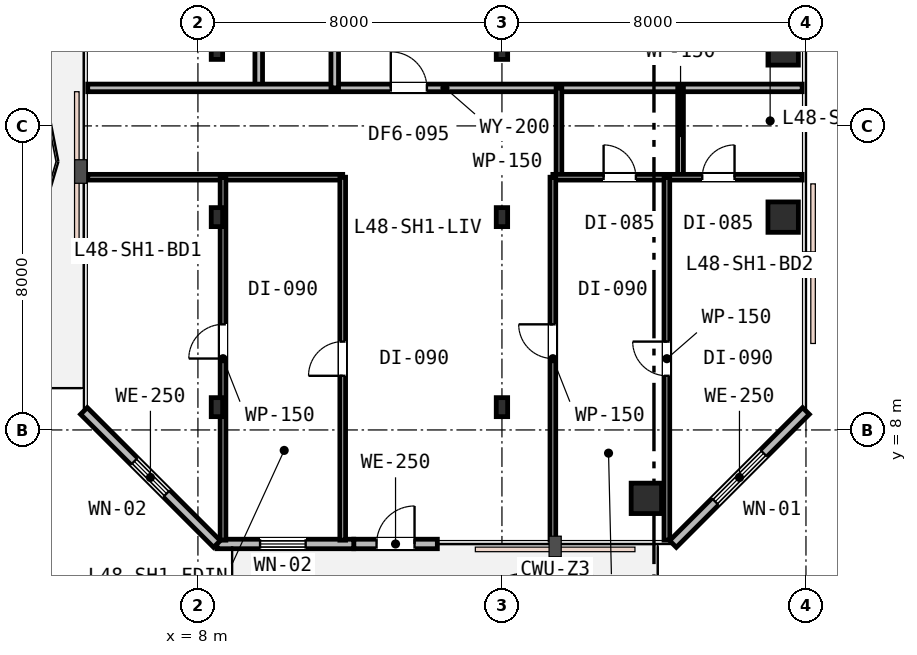
"""IFC4 building model, lengths in metres.
Left out: names, types, materials, properties, quantities, classifications, styles, units other than length and angle.
Written with IfcOpenShell. Run it as: python <this file> out.ifc"""

import sys

from ifc_helpers import new_model, si_unit, direction, frame, frame_2d, origin, origin_2d, place, context, subcontext, project, spatial, rectangle, i_section, extrude, element, fill, save


model = new_model("IFC4")
c1 = context("Model", 3, precision=1e-05, world=origin(), true_north=direction((0.0, 1.0)))
c2 = subcontext(c1, "Body", "Model", "MODEL_VIEW")
j1 = project(units=[si_unit("LENGTHUNIT", "METRE"), si_unit("PLANEANGLEUNIT", "RADIAN")], contexts=[c1])
p1 = place(None, origin())
s1 = spatial("IfcSite", under=j1, at=p1, CompositionType="ELEMENT")
p2 = place(p1, origin())
s2 = spatial("IfcBuilding", under=s1, at=p2, CompositionType="ELEMENT")
p3 = place(p2, frame((0.0, 0.0, 186.6)))
s3 = spatial("IfcBuildingStorey", under=s2, at=p3, CompositionType="ELEMENT", Elevation=186.6)
for number, where, z_axis, x_axis in (
    (1, (19.8, 6.2, 0.0), (0.0, 0.0, 1.0), (1.0, 0.0, 0.0)),
    (2, (23.4, 13.6, 0.0), (0.0, 0.0, 1.0), (1.0, 0.0, 0.0)),
    (3, (23.4, 18.0, 0.0), (0.0, 0.0, 1.0), (1.0, 0.0, 0.0)),
):
    element("IfcColumn", number, at=place(p3, frame(where, z_axis=z_axis, x_axis=x_axis)), inside=s3, PredefinedType="COLUMN", context=c2, shape_type="SweptSolid", body=[
        extrude(rectangle(XDim=0.8, YDim=0.8, at=origin_2d()), origin(), (0.0, 0.0, 1.0), 3.6),
    ])
for number, where, z_axis, x_axis in (
    (4, (8.5, 8.6, 0.0), (0.0, 0.0, 1.0), (1.0, 0.0, 0.0)),
    (5, (16.0, 8.6, 0.0), (0.0, 0.0, 1.0), (1.0, 0.0, 0.0)),
    (6, (8.5, 13.6, 0.0), (0.0, 0.0, 1.0), (1.0, 0.0, 0.0)),
    (7, (16.0, 13.6, 0.0), (0.0, 0.0, 1.0), (1.0, 0.0, 0.0)),
    (8, (8.5, 18.0, 0.0), (0.0, 0.0, 1.0), (1.0, 0.0, 0.0)),
    (9, (16.0, 18.0, 0.0), (0.0, 0.0, 1.0), (1.0, 0.0, 0.0)),
):
    element("IfcColumn", number, at=place(p3, frame(where, z_axis=z_axis, x_axis=x_axis)), inside=s3, PredefinedType="COLUMN", context=c2, shape_type="SweptSolid", body=[
        extrude(i_section(OverallWidth=0.3, OverallDepth=0.5, WebThickness=0.015, FlangeThickness=0.028, FilletRadius=0.027, at=origin_2d()), origin(), (0.0, 0.0, 1.0), 3.6),
    ])
p4 = place(p3, frame((12.1, 5.0, 0.0), z_axis=(0.0, 0.0, 1.0), x_axis=(1.0, 0.0, 0.0)))
e10 = element("IfcWall", 10, at=p4, inside=s3, PredefinedType="STANDARD", context=c2, shape_type="SweptSolid", body=[
    extrude(rectangle(XDim=2.2, YDim=0.25, at=frame_2d((1.1, 0.0))), origin(), (0.0, 0.0, 1.0), 3.33),
])
p5 = place(p4, frame((0.6, 0.0, 0.0)))
e11 = element("IfcOpeningElement", 11, at=p5, cuts=e10, PredefinedType="OPENING", context=c2, shape_type="SweptSolid", body=[
    extrude(rectangle(XDim=1.0, YDim=2.15, at=frame_2d((0.5, 1.075))), frame((0.0, 0.135, 0.0), z_axis=(0.0, -1.0, 0.0), x_axis=(1.0, 0.0, 0.0)), (0.0, 0.0, 1.0), 0.27),
])
p6 = place(p3, frame((8.5, 5.0, 0.0), z_axis=(0.0, 0.0, 1.0), x_axis=(1.0, 0.0, 0.0)))
e12 = element("IfcWall", 12, at=p6, inside=s3, PredefinedType="STANDARD", context=c2, shape_type="SweptSolid", body=[
    extrude(rectangle(XDim=3.6, YDim=0.25, at=frame_2d((1.8, 0.0))), origin(), (0.0, 0.0, 1.0), 3.33),
])
p7 = place(p6, frame((1.135, 0.0, 0.85)))
e13 = element("IfcOpeningElement", 13, at=p7, cuts=e12, PredefinedType="OPENING", context=c2, shape_type="SweptSolid", body=[
    extrude(rectangle(XDim=1.2, YDim=1.6, at=frame_2d((0.6, 0.8))), frame((0.0, 0.135, 0.0), z_axis=(0.0, -1.0, 0.0), x_axis=(1.0, 0.0, 0.0)), (0.0, 0.0, 1.0), 0.27),
])
p8 = place(p3, frame((20.5, 5.0, 0.0), z_axis=(0.0, 0.0, 1.0), x_axis=(0.707106781187, 0.707106781187, 0.0)))
e14 = element("IfcWall", 14, at=p8, inside=s3, PredefinedType="STANDARD", context=c2, shape_type="SweptSolid", body=[
    extrude(rectangle(XDim=4.95, YDim=0.25, at=frame_2d((2.475, 0.0))), origin(), (0.0, 0.0, 1.0), 3.33),
])
p9 = place(p8, frame((1.575, 0.0, 0.75)))
e15 = element("IfcOpeningElement", 15, at=p9, cuts=e14, PredefinedType="OPENING", context=c2, shape_type="SweptSolid", body=[
    extrude(rectangle(XDim=1.8, YDim=1.85, at=frame_2d((0.9, 0.925))), frame((0.0, 0.135, 0.0), z_axis=(0.0, -1.0, 0.0), x_axis=(1.0, 0.0, 0.0)), (0.0, 0.0, 1.0), 0.27),
])
p10 = place(p3, frame((5.0, 8.5, 0.0), z_axis=(0.0, 0.0, 1.0), x_axis=(0.707106781187, -0.707106781187, 0.0)))
e16 = element("IfcWall", 16, at=p10, inside=s3, PredefinedType="STANDARD", context=c2, shape_type="SweptSolid", body=[
    extrude(rectangle(XDim=4.95, YDim=0.25, at=frame_2d((2.475, 0.0))), origin(), (0.0, 0.0, 1.0), 3.33),
])
p11 = place(p10, frame((1.875, 0.0, 0.85)))
e17 = element("IfcOpeningElement", 17, at=p11, cuts=e16, PredefinedType="OPENING", context=c2, shape_type="SweptSolid", body=[
    extrude(rectangle(XDim=1.2, YDim=1.6, at=frame_2d((0.6, 0.8))), frame((0.0, 0.135, 0.0), z_axis=(0.0, -1.0, 0.0), x_axis=(1.0, 0.0, 0.0)), (0.0, 0.0, 1.0), 0.27),
])
p12 = place(p3, frame((9.6, 17.0, 0.0), z_axis=(0.0, 0.0, 1.0), x_axis=(0.0, 1.0, 0.0)))
e18 = element("IfcWall", 18, at=p12, inside=s3, PredefinedType="PARTITIONING", context=c2, shape_type="SweptSolid", body=[
    extrude(rectangle(XDim=25.9, YDim=0.2, at=frame_2d((12.95, 0.0))), origin(), (0.0, 0.0, 1.0), 2.92),
])
p13 = place(p12, frame((12.045, 0.0, 0.0)))
e19 = element("IfcOpeningElement", 19, at=p13, cuts=e18, PredefinedType="OPENING", context=c2, shape_type="SweptSolid", body=[
    extrude(rectangle(XDim=0.95, YDim=2.15, at=frame_2d((0.475, 1.075))), frame((0.0, 0.11, 0.0), z_axis=(0.0, -1.0, 0.0), x_axis=(1.0, 0.0, 0.0)), (0.0, 0.0, 1.0), 0.22),
])
p14 = place(p12, frame((3.125, 0.0, 0.0)))
e20 = element("IfcOpeningElement", 20, at=p14, cuts=e18, PredefinedType="OPENING", context=c2, shape_type="SweptSolid", body=[
    extrude(rectangle(XDim=0.95, YDim=2.15, at=frame_2d((0.475, 1.075))), frame((0.0, 0.11, 0.0), z_axis=(0.0, -1.0, 0.0), x_axis=(1.0, 0.0, 0.0)), (0.0, 0.0, 1.0), 0.22),
])
p15 = place(p3, frame((5.1, 17.0, 0.0), z_axis=(0.0, 0.0, 1.0), x_axis=(1.0, 0.0, 0.0)))
e21 = element("IfcWall", 21, at=p15, inside=s3, PredefinedType="PARTITIONING", context=c2, shape_type="SweptSolid", body=[
    extrude(rectangle(XDim=18.8, YDim=0.2, at=frame_2d((9.4, 0.0))), origin(), (0.0, 0.0, 1.0), 2.92),
])
p16 = place(p15, frame((7.975, 0.0, 0.0)))
e22 = element("IfcOpeningElement", 22, at=p16, cuts=e21, PredefinedType="OPENING", context=c2, shape_type="SweptSolid", body=[
    extrude(rectangle(XDim=0.95, YDim=2.15, at=frame_2d((0.475, 1.075))), frame((0.0, 0.11, 0.0), z_axis=(0.0, -1.0, 0.0), x_axis=(1.0, 0.0, 0.0)), (0.0, 0.0, 1.0), 0.22),
])
p17 = place(p3, frame((11.6, 17.0, 0.0), z_axis=(0.0, 0.0, 1.0), x_axis=(0.0, 1.0, 0.0)))
e23 = element("IfcWall", 23, at=p17, inside=s3, PredefinedType="PARTITIONING", context=c2, shape_type="SweptSolid", body=[
    extrude(rectangle(XDim=11.6, YDim=0.2, at=frame_2d((5.8, 0.0))), origin(), (0.0, 0.0, 1.0), 2.92),
])
p18 = place(p17, frame((8.225, 0.0, 0.0)))
e24 = element("IfcOpeningElement", 24, at=p18, cuts=e23, PredefinedType="OPENING", context=c2, shape_type="SweptSolid", body=[
    extrude(rectangle(XDim=0.95, YDim=2.15, at=frame_2d((0.475, 1.075))), frame((0.0, 0.11, 0.0), z_axis=(0.0, -1.0, 0.0), x_axis=(1.0, 0.0, 0.0)), (0.0, 0.0, 1.0), 0.22),
])
p19 = place(p17, frame((2.425, 0.0, 0.0)))
e25 = element("IfcOpeningElement", 25, at=p19, cuts=e23, PredefinedType="OPENING", context=c2, shape_type="SweptSolid", body=[
    extrude(rectangle(XDim=0.95, YDim=2.15, at=frame_2d((0.475, 1.075))), frame((0.0, 0.11, 0.0), z_axis=(0.0, -1.0, 0.0), x_axis=(1.0, 0.0, 0.0)), (0.0, 0.0, 1.0), 0.22),
])
p20 = place(p3, frame((17.5, 14.65, 0.0), z_axis=(0.0, 0.0, 1.0), x_axis=(0.0, 1.0, 0.0)))
e26 = element("IfcWall", 26, at=p20, inside=s3, PredefinedType="PARTITIONING", context=c2, shape_type="SweptSolid", body=[
    extrude(rectangle(XDim=2.35, YDim=0.15, at=frame_2d((1.175, 0.0))), origin(), (0.0, 0.0, 1.0), 3.33),
])
p21 = place(p3, frame((20.7, 14.65, 0.0), z_axis=(0.0, 0.0, 1.0), x_axis=(0.0, 1.0, 0.0)))
e27 = element("IfcWall", 27, at=p21, inside=s3, PredefinedType="PARTITIONING", context=c2, shape_type="SweptSolid", body=[
    extrude(rectangle(XDim=2.35, YDim=0.15, at=frame_2d((1.175, 0.0))), origin(), (0.0, 0.0, 1.0), 3.07),
])
p22 = place(p3, frame((17.34, 14.65, 0.0), z_axis=(0.0, 0.0, 1.0), x_axis=(1.0, 0.0, 0.0)))
e28 = element("IfcWall", 28, at=p22, inside=s3, PredefinedType="PARTITIONING", context=c2, shape_type="SweptSolid", body=[
    extrude(rectangle(XDim=6.56, YDim=0.15, at=frame_2d((3.28, 0.0))), origin(), (0.0, 0.0, 1.0), 3.02),
])
p23 = place(p22, frame((1.335, 0.0, 0.0)))
e29 = element("IfcOpeningElement", 29, at=p23, cuts=e28, PredefinedType="OPENING", context=c2, shape_type="SweptSolid", body=[
    extrude(rectangle(XDim=0.85, YDim=2.15, at=frame_2d((0.425, 1.075))), frame((0.0, 0.085, 0.0), z_axis=(0.0, -1.0, 0.0), x_axis=(1.0, 0.0, 0.0)), (0.0, 0.0, 1.0), 0.17),
])
p24 = place(p22, frame((3.93, 0.0, 0.0)))
e30 = element("IfcOpeningElement", 30, at=p24, cuts=e28, PredefinedType="OPENING", context=c2, shape_type="SweptSolid", body=[
    extrude(rectangle(XDim=0.85, YDim=2.15, at=frame_2d((0.425, 1.075))), frame((0.0, 0.085, 0.0), z_axis=(0.0, -1.0, 0.0), x_axis=(1.0, 0.0, 0.0)), (0.0, 0.0, 1.0), 0.17),
])
p25 = place(p3, frame((5.1, 14.65, 0.0), z_axis=(0.0, 0.0, 1.0), x_axis=(1.0, 0.0, 0.0)))
e31 = element("IfcWall", 31, at=p25, inside=s3, PredefinedType="PARTITIONING", context=c2, shape_type="SweptSolid", body=[
    extrude(rectangle(XDim=6.71, YDim=0.15, at=frame_2d((3.355, 0.0))), origin(), (0.0, 0.0, 1.0), 2.92),
])
p26 = place(p3, frame((8.66, 5.1, 0.0), z_axis=(0.0, 0.0, 1.0), x_axis=(0.0, 1.0, 0.0)))
e32 = element("IfcWall", 32, at=p26, inside=s3, PredefinedType="PARTITIONING", context=c2, shape_type="SweptSolid", body=[
    extrude(rectangle(XDim=9.55, YDim=0.15, at=frame_2d((4.775, 0.0))), origin(), (0.0, 0.0, 1.0), 2.92),
])
p27 = place(p26, frame((4.779, 0.0, 0.0)))
e33 = element("IfcOpeningElement", 33, at=p27, cuts=e32, PredefinedType="OPENING", context=c2, shape_type="SweptSolid", body=[
    extrude(rectangle(XDim=0.9, YDim=2.15, at=frame_2d((0.45, 1.075))), frame((0.0, 0.085, 0.0), z_axis=(0.0, -1.0, 0.0), x_axis=(1.0, 0.0, 0.0)), (0.0, 0.0, 1.0), 0.17),
])
p28 = place(p3, frame((20.34, 5.1, 0.0), z_axis=(0.0, 0.0, 1.0), x_axis=(0.0, 1.0, 0.0)))
e34 = element("IfcWall", 34, at=p28, inside=s3, PredefinedType="PARTITIONING", context=c2, shape_type="SweptSolid", body=[
    extrude(rectangle(XDim=9.55, YDim=0.15, at=frame_2d((4.775, 0.0))), origin(), (0.0, 0.0, 1.0), 2.92),
])
p29 = place(p28, frame((4.325, 0.0, 0.0)))
e35 = element("IfcOpeningElement", 35, at=p29, cuts=e34, PredefinedType="OPENING", context=c2, shape_type="SweptSolid", body=[
    extrude(rectangle(XDim=0.9, YDim=2.15, at=frame_2d((0.45, 1.075))), frame((0.0, 0.085, 0.0), z_axis=(0.0, -1.0, 0.0), x_axis=(1.0, 0.0, 0.0)), (0.0, 0.0, 1.0), 0.17),
])
p30 = place(p3, frame((17.34, 5.1, 0.0), z_axis=(0.0, 0.0, 1.0), x_axis=(0.0, 1.0, 0.0)))
e36 = element("IfcWall", 36, at=p30, inside=s3, PredefinedType="PARTITIONING", context=c2, shape_type="SweptSolid", body=[
    extrude(rectangle(XDim=9.55, YDim=0.15, at=frame_2d((4.775, 0.0))), origin(), (0.0, 0.0, 1.0), 2.92),
])
p31 = place(p30, frame((4.779, 0.0, 0.0)))
e37 = element("IfcOpeningElement", 37, at=p31, cuts=e36, PredefinedType="OPENING", context=c2, shape_type="SweptSolid", body=[
    extrude(rectangle(XDim=0.9, YDim=2.15, at=frame_2d((0.45, 1.075))), frame((0.0, 0.085, 0.0), z_axis=(0.0, -1.0, 0.0), x_axis=(1.0, 0.0, 0.0)), (0.0, 0.0, 1.0), 0.17),
])
p32 = place(p3, frame((11.81, 5.1, 0.0), z_axis=(0.0, 0.0, 1.0), x_axis=(0.0, 1.0, 0.0)))
e38 = element("IfcWall", 38, at=p32, inside=s3, PredefinedType="PARTITIONING", context=c2, shape_type="SweptSolid", body=[
    extrude(rectangle(XDim=9.55, YDim=0.15, at=frame_2d((4.775, 0.0))), origin(), (0.0, 0.0, 1.0), 2.92),
])
p33 = place(p32, frame((4.325, 0.0, 0.0)))
e39 = element("IfcOpeningElement", 39, at=p33, cuts=e38, PredefinedType="OPENING", context=c2, shape_type="SweptSolid", body=[
    extrude(rectangle(XDim=0.9, YDim=2.15, at=frame_2d((0.45, 1.075))), frame((0.0, 0.085, 0.0), z_axis=(0.0, -1.0, 0.0), x_axis=(1.0, 0.0, 0.0)), (0.0, 0.0, 1.0), 0.17),
])
p34 = place(p5, origin())
e40 = element("IfcDoor", 40, at=p34, inside=s3, OperationType="SINGLE_SWING_RIGHT", PredefinedType="DOOR", context=c2, shape_type="SweptSolid", body=[
    extrude(rectangle(XDim=1.0, YDim=2.15, at=frame_2d((0.5, 1.075))), frame((0.0, 0.025, 0.0), z_axis=(0.0, -1.0, 0.0), x_axis=(1.0, 0.0, 0.0)), (0.0, 0.0, 1.0), 0.05),
])
fill(e11, e40)
p35 = place(p7, origin())
e41 = element("IfcWindow", 41, at=p35, inside=s3, PartitioningType="SINGLE_PANEL", PredefinedType="WINDOW", context=c2, shape_type="SweptSolid", body=[
    extrude(rectangle(XDim=1.2, YDim=1.6, at=frame_2d((0.6, 0.8))), frame((0.0, 0.03, 0.0), z_axis=(0.0, -1.0, 0.0), x_axis=(1.0, 0.0, 0.0)), (0.0, 0.0, 1.0), 0.06),
])
fill(e13, e41)
p36 = place(p9, origin())
e42 = element("IfcWindow", 42, at=p36, inside=s3, PartitioningType="SINGLE_PANEL", PredefinedType="WINDOW", context=c2, shape_type="SweptSolid", body=[
    extrude(rectangle(XDim=1.8, YDim=1.85, at=frame_2d((0.9, 0.925))), frame((0.0, 0.03, 0.0), z_axis=(0.0, -1.0, 0.0), x_axis=(1.0, 0.0, 0.0)), (0.0, 0.0, 1.0), 0.06),
])
fill(e15, e42)
p37 = place(p11, origin())
e43 = element("IfcWindow", 43, at=p37, inside=s3, PartitioningType="SINGLE_PANEL", PredefinedType="WINDOW", context=c2, shape_type="SweptSolid", body=[
    extrude(rectangle(XDim=1.2, YDim=1.6, at=frame_2d((0.6, 0.8))), frame((0.0, 0.03, 0.0), z_axis=(0.0, -1.0, 0.0), x_axis=(1.0, 0.0, 0.0)), (0.0, 0.0, 1.0), 0.06),
])
fill(e17, e43)
p38 = place(p16, origin())
e44 = element("IfcDoor", 44, at=p38, inside=s3, OperationType="SINGLE_SWING_LEFT", PredefinedType="DOOR", context=c2, shape_type="SweptSolid", body=[
    extrude(rectangle(XDim=0.95, YDim=2.15, at=frame_2d((0.475, 1.075))), frame((0.0, 0.025, 0.0), z_axis=(0.0, -1.0, 0.0), x_axis=(1.0, 0.0, 0.0)), (0.0, 0.0, 1.0), 0.05),
])
fill(e22, e44)
p39 = place(p23, origin())
e45 = element("IfcDoor", 45, at=p39, inside=s3, OperationType="SINGLE_SWING_LEFT", PredefinedType="DOOR", context=c2, shape_type="SweptSolid", body=[
    extrude(rectangle(XDim=0.85, YDim=2.15, at=frame_2d((0.425, 1.075))), frame((0.0, 0.025, 0.0), z_axis=(0.0, -1.0, 0.0), x_axis=(1.0, 0.0, 0.0)), (0.0, 0.0, 1.0), 0.05),
])
fill(e29, e45)
p40 = place(p24, origin())
e46 = element("IfcDoor", 46, at=p40, inside=s3, OperationType="SINGLE_SWING_RIGHT", PredefinedType="DOOR", context=c2, shape_type="SweptSolid", body=[
    extrude(rectangle(XDim=0.85, YDim=2.15, at=frame_2d((0.425, 1.075))), frame((0.0, 0.025, 0.0), z_axis=(0.0, -1.0, 0.0), x_axis=(1.0, 0.0, 0.0)), (0.0, 0.0, 1.0), 0.05),
])
fill(e30, e46)
p41 = place(p27, origin())
e47 = element("IfcDoor", 47, at=p41, inside=s3, OperationType="SINGLE_SWING_LEFT", PredefinedType="DOOR", context=c2, shape_type="SweptSolid", body=[
    extrude(rectangle(XDim=0.9, YDim=2.15, at=frame_2d((0.45, 1.075))), frame((0.0, 0.025, 0.0), z_axis=(0.0, -1.0, 0.0), x_axis=(1.0, 0.0, 0.0)), (0.0, 0.0, 1.0), 0.05),
])
fill(e33, e47)
p42 = place(p29, origin())
e48 = element("IfcDoor", 48, at=p42, inside=s3, OperationType="SINGLE_SWING_RIGHT", PredefinedType="DOOR", context=c2, shape_type="SweptSolid", body=[
    extrude(rectangle(XDim=0.9, YDim=2.15, at=frame_2d((0.45, 1.075))), frame((0.0, 0.025, 0.0), z_axis=(0.0, -1.0, 0.0), x_axis=(1.0, 0.0, 0.0)), (0.0, 0.0, 1.0), 0.05),
])
fill(e35, e48)
p43 = place(p31, origin())
e49 = element("IfcDoor", 49, at=p43, inside=s3, OperationType="SINGLE_SWING_RIGHT", PredefinedType="DOOR", context=c2, shape_type="SweptSolid", body=[
    extrude(rectangle(XDim=0.9, YDim=2.15, at=frame_2d((0.45, 1.075))), frame((0.0, 0.025, 0.0), z_axis=(0.0, -1.0, 0.0), x_axis=(1.0, 0.0, 0.0)), (0.0, 0.0, 1.0), 0.05),
])
fill(e37, e49)
p44 = place(p33, origin())
e50 = element("IfcDoor", 50, at=p44, inside=s3, OperationType="SINGLE_SWING_LEFT", PredefinedType="DOOR", context=c2, shape_type="SweptSolid", body=[
    extrude(rectangle(XDim=0.9, YDim=2.15, at=frame_2d((0.45, 1.075))), frame((0.0, 0.025, 0.0), z_axis=(0.0, -1.0, 0.0), x_axis=(1.0, 0.0, 0.0)), (0.0, 0.0, 1.0), 0.05),
])
fill(e39, e50)
save(model, sys.argv[1])
